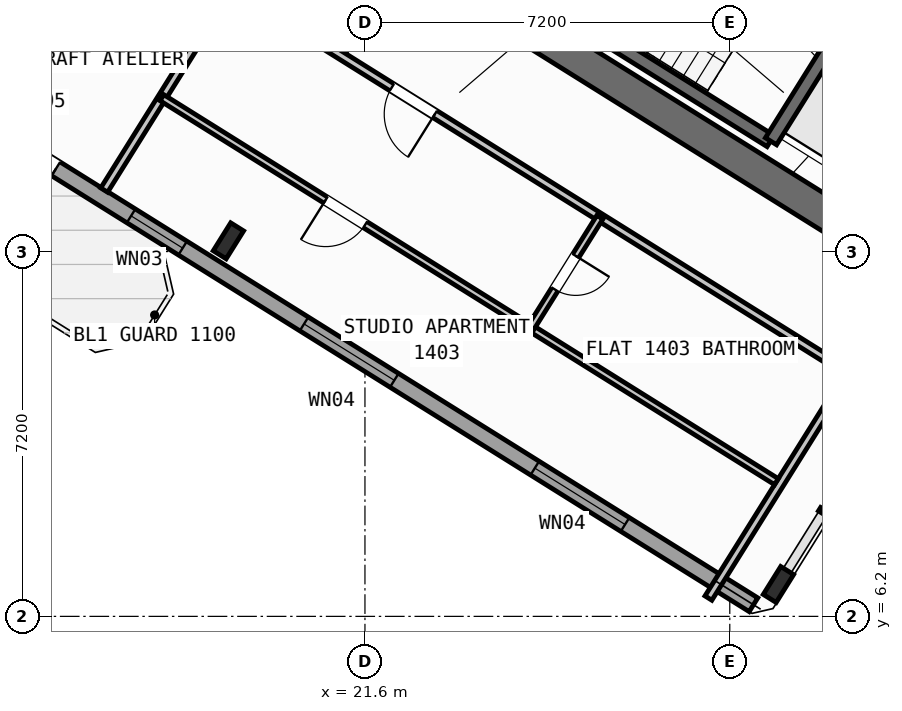
"""IFC4 building model, lengths in metres.
Left out: names, types, materials, properties, quantities, classifications, styles, units other than length and angle.
Written with IfcOpenShell. Run it as: python <this file> out.ifc"""

import sys

from ifc_helpers import new_model, si_unit, direction, frame, frame_2d, origin, origin_2d, place, context, subcontext, project, spatial, rectangle, i_section, extrude, source, transform, mapped, element, fill, save


model = new_model("IFC4")
c1 = context("Model", 3, precision=1e-05, world=origin(), true_north=direction((0.0, 1.0)))
c2 = subcontext(c1, "Body", "Model", "MODEL_VIEW")
j1 = project(units=[si_unit("LENGTHUNIT", "METRE"), si_unit("PLANEANGLEUNIT", "RADIAN")], contexts=[c1])
p1 = place(None, origin())
s1 = spatial("IfcSite", under=j1, at=p1, CompositionType="ELEMENT")
p2 = place(p1, origin())
s2 = spatial("IfcBuilding", under=s1, at=p2, CompositionType="ELEMENT")
p3 = place(p2, frame((0.0, 0.0, 56.4)))
s3 = spatial("IfcBuildingStorey", under=s2, at=p3, CompositionType="ELEMENT", Elevation=56.4)
p4 = place(p3, frame((33.409, 12.45, 0.0), z_axis=(0.0, 0.0, 1.0), x_axis=(-0.848051132073, 0.529914405721, 0.0)))
e1 = element("IfcWall", 1, at=p4, inside=s3, PredefinedType="SHEAR", context=c2, shape_type="SweptSolid", body=[
    extrude(rectangle(XDim=13.24, YDim=0.65, at=frame_2d((6.62, 0.0))), origin(), (0.0, 0.0, 1.0), 3.35),
])
m1 = source(origin(), c2, "Body", "SweptSolid", [
    extrude(i_section(OverallWidth=0.3, OverallDepth=0.65, WebThickness=0.016, FlangeThickness=0.031, at=origin_2d()), origin(), (0.0, 0.0, 1.0), 3.6),
])
for number, where, z_axis, x_axis in (
    (2, (29.761, 6.829, 0.0), (0.0, 0.0, 1.0), (-0.848, 0.53, 0.0)),
    (3, (18.906, 13.612, 0.0), (0.0, 0.0, 1.0), (-0.848, 0.53, 0.0)),
):
    element("IfcColumn", number, at=place(p3, frame(where, z_axis=z_axis, x_axis=x_axis)), inside=s3, PredefinedType="COLUMN", context=c2, shape_type="MappedRepresentation", body=[
        mapped(m1, transform((0.0, 0.0, 0.0), scale=1.0)),
    ])
p5 = place(p3, frame((29.268, 6.429, 0.0), z_axis=(0.0, 0.0, 1.0), x_axis=(-0.848049971435, 0.529916263149, 0.0)))
e4 = element("IfcWall", 4, at=p5, inside=s3, PredefinedType="STANDARD", context=c2, shape_type="SweptSolid", body=[
    extrude(rectangle(XDim=31.588, YDim=0.32, at=frame_2d((15.794, 0.0))), origin(), (0.0, 0.0, 1.0), 3.35),
])
p6 = place(p5, frame((16.235, 0.0, 0.0)))
e5 = element("IfcOpeningElement", 5, at=p6, cuts=e4, PredefinedType="OPENING", context=c2, shape_type="SweptSolid", body=[
    extrude(rectangle(XDim=1.2, YDim=2.15, at=frame_2d((0.6, 1.075))), frame((0.0, 0.17, 0.0), z_axis=(0.0, -1.0, 0.0), x_axis=(1.0, 0.0, 0.0)), (0.0, 0.0, 1.0), 0.34),
])
p7 = place(p5, frame((2.989, 0.0, 0.8)))
e6 = element("IfcOpeningElement", 6, at=p7, cuts=e4, PredefinedType="OPENING", context=c2, shape_type="SweptSolid", body=[
    extrude(rectangle(XDim=2.1, YDim=1.55, at=frame_2d((1.05, 0.775))), frame((0.0, 0.17, 0.0), z_axis=(0.0, -1.0, 0.0), x_axis=(1.0, 0.0, 0.0)), (0.0, 0.0, 1.0), 0.34),
])
p8 = place(p5, frame((8.359, 0.0, 0.8)))
e7 = element("IfcOpeningElement", 7, at=p8, cuts=e4, PredefinedType="OPENING", context=c2, shape_type="SweptSolid", body=[
    extrude(rectangle(XDim=2.1, YDim=1.55, at=frame_2d((1.05, 0.775))), frame((0.0, 0.17, 0.0), z_axis=(0.0, -1.0, 0.0), x_axis=(1.0, 0.0, 0.0)), (0.0, 0.0, 1.0), 0.34),
])
p9 = place(p5, frame((13.284, 0.0, 0.95)))
e8 = element("IfcOpeningElement", 8, at=p9, cuts=e4, PredefinedType="OPENING", context=c2, shape_type="SweptSolid", body=[
    extrude(rectangle(XDim=1.2, YDim=1.4, at=frame_2d((0.6, 0.7))), frame((0.0, 0.17, 0.0), z_axis=(0.0, -1.0, 0.0), x_axis=(1.0, 0.0, 0.0)), (0.0, 0.0, 1.0), 0.34),
])
p10 = place(p5, frame((22.374, 0.0, 0.95)))
e9 = element("IfcOpeningElement", 9, at=p10, cuts=e4, PredefinedType="OPENING", context=c2, shape_type="SweptSolid", body=[
    extrude(rectangle(XDim=1.2, YDim=1.4, at=frame_2d((0.6, 0.7))), frame((0.0, 0.17, 0.0), z_axis=(0.0, -1.0, 0.0), x_axis=(1.0, 0.0, 0.0)), (0.0, 0.0, 1.0), 0.34),
])
p11 = place(p5, frame((26.351, 0.0, 1.0)))
e10 = element("IfcOpeningElement", 10, at=p11, cuts=e4, PredefinedType="OPENING", context=c2, shape_type="SweptSolid", body=[
    extrude(rectangle(XDim=0.9, YDim=1.25, at=frame_2d((0.45, 0.625))), frame((0.0, 0.17, 0.0), z_axis=(0.0, -1.0, 0.0), x_axis=(1.0, 0.0, 0.0)), (0.0, 0.0, 1.0), 0.34),
])
p12 = place(p5, frame((29.052, 0.0, 0.85)))
e11 = element("IfcOpeningElement", 11, at=p12, cuts=e4, PredefinedType="OPENING", context=c2, shape_type="SweptSolid", body=[
    extrude(rectangle(XDim=1.8, YDim=1.5, at=frame_2d((0.9, 0.75))), frame((0.0, 0.17, 0.0), z_axis=(0.0, -1.0, 0.0), x_axis=(1.0, 0.0, 0.0)), (0.0, 0.0, 1.0), 0.34),
])
p13 = place(p3, frame((29.605, 15.581, 0.0), z_axis=(0.0, 0.0, 1.0), x_axis=(-0.848036911448, 0.529937163087, 0.0)))
e12 = element("IfcWall", 12, at=p13, inside=s3, PredefinedType="SHEAR", context=c2, shape_type="SweptSolid", body=[
    extrude(rectangle(XDim=7.46, YDim=0.26, at=frame_2d((3.73, 0.0))), origin(), (0.0, 0.0, 1.0), 3.35),
])
p14 = place(p3, frame((31.288, 18.256, 0.0), z_axis=(0.0, 0.0, 1.0), x_axis=(-0.529943379326, -0.848033026897, 0.0)))
e13 = element("IfcWall", 13, at=p14, inside=s3, PredefinedType="SHEAR", context=c2, shape_type="SweptSolid", body=[
    extrude(rectangle(XDim=3.16, YDim=0.26, at=frame_2d((1.58, 0.0))), origin(), (0.0, 0.0, 1.0), 3.35),
])
p15 = place(p3, frame((21.206, 17.292, 0.0), z_axis=(0.0, 0.0, 1.0), x_axis=(-0.848050851465, 0.529914854792, 0.0)))
e14 = element("IfcWall", 14, at=p15, inside=s3, PredefinedType="PARTITIONING", context=c2, shape_type="SweptSolid", body=[
    extrude(rectangle(XDim=2.61, YDim=0.16, at=frame_2d((1.305, 0.0))), origin(), (0.0, 0.0, 1.0), 3.34),
])
p16 = place(p3, frame((20.719, 21.44, 0.0), z_axis=(0.0, 0.0, 1.0), x_axis=(-0.529906246318, -0.848056230514, 0.0)))
e15 = element("IfcWall", 15, at=p16, inside=s3, PredefinedType="PARTITIONING", context=c2, shape_type="SweptSolid", body=[
    extrude(rectangle(XDim=8.05, YDim=0.16, at=frame_2d((4.025, 0.0))), origin(), (0.0, 0.0, 1.0), 3.34),
])
p17 = place(p3, frame((18.31, 22.946, 0.0), z_axis=(0.0, 0.0, 1.0), x_axis=(-0.529914428959, -0.848051117552, 0.0)))
e16 = element("IfcWall", 16, at=p17, inside=s3, PredefinedType="PARTITIONING", context=c2, shape_type="SweptSolid", body=[
    extrude(rectangle(XDim=8.05, YDim=0.16, at=frame_2d((4.025, 0.0))), origin(), (0.0, 0.0, 1.0), 3.34),
])
p18 = place(p3, frame((32.164, 10.374, 0.0), z_axis=(0.0, 0.0, 1.0), x_axis=(-0.848044107957, 0.529925646633, 0.0)))
e17 = element("IfcWall", 17, at=p18, inside=s3, PredefinedType="PARTITIONING", context=c2, shape_type="SweptSolid", body=[
    extrude(rectangle(XDim=15.57, YDim=0.16, at=frame_2d((7.785, 0.0))), origin(), (0.0, 0.0, 1.0), 3.34),
])
p19 = place(p18, frame((10.83, 0.0, 0.0)))
e18 = element("IfcOpeningElement", 18, at=p19, cuts=e17, PredefinedType="OPENING", context=c2, shape_type="SweptSolid", body=[
    extrude(rectangle(XDim=1.0, YDim=2.1, at=frame_2d((0.5, 1.05))), frame((0.0, 0.09, 0.0), z_axis=(0.0, -1.0, 0.0), x_axis=(1.0, 0.0, 0.0)), (0.0, 0.0, 1.0), 0.18),
])
p20 = place(p3, frame((31.282, 11.208, 0.0), z_axis=(0.0, 0.0, 1.0), x_axis=(-0.529938869374, -0.84803584519, 0.0)))
e19 = element("IfcWall", 19, at=p20, inside=s3, PredefinedType="PARTITIONING", context=c2, shape_type="SweptSolid", body=[
    extrude(rectangle(XDim=5.48, YDim=0.16, at=frame_2d((2.74, 0.0))), origin(), (0.0, 0.0, 1.0), 3.34),
])
p21 = place(p3, frame((29.72, 8.859, 0.0), z_axis=(0.0, 0.0, 1.0), x_axis=(-0.848049134363, 0.529917602752, 0.0)))
e20 = element("IfcWall", 20, at=p21, inside=s3, PredefinedType="PLUMBINGWALL", context=c2, shape_type="SweptSolid", body=[
    extrude(rectangle(XDim=14.3, YDim=0.14, at=frame_2d((7.15, 0.0))), origin(), (0.0, 0.0, 1.0), 3.34),
])
p22 = place(p21, frame((9.57, 0.0, 0.0)))
e21 = element("IfcOpeningElement", 21, at=p22, cuts=e20, PredefinedType="OPENING", context=c2, shape_type="SweptSolid", body=[
    extrude(rectangle(XDim=0.92, YDim=2.08, at=frame_2d((0.46, 1.04))), frame((0.0, 0.08, 0.0), z_axis=(0.0, -1.0, 0.0), x_axis=(1.0, 0.0, 0.0)), (0.0, 0.0, 1.0), 0.16),
])
p23 = place(p3, frame((26.237, 14.078, 0.0), z_axis=(0.0, 0.0, 1.0), x_axis=(-0.52995640672, -0.848024885824, 0.0)))
e22 = element("IfcWall", 22, at=p23, inside=s3, PredefinedType="PLUMBINGWALL", context=c2, shape_type="SweptSolid", body=[
    extrude(rectangle(XDim=2.58, YDim=0.14, at=frame_2d((1.29, 0.0))), origin(), (0.0, 0.0, 1.0), 3.34),
])
p24 = place(p23, frame((0.9, 0.0, 0.0)))
e23 = element("IfcOpeningElement", 23, at=p24, cuts=e22, PredefinedType="OPENING", context=c2, shape_type="SweptSolid", body=[
    extrude(rectangle(XDim=0.78, YDim=2.05, at=frame_2d((0.39, 1.025))), frame((0.0, 0.08, 0.0), z_axis=(0.0, -1.0, 0.0), x_axis=(1.0, 0.0, 0.0)), (0.0, 0.0, 1.0), 0.16),
])
m2 = source(origin(), c2, "Body", "SweptSolid", [
    extrude(rectangle(XDim=1.2, YDim=2.15, at=frame_2d((0.6, 1.075))), frame((0.0, 0.025, 0.0), z_axis=(0.0, -1.0, 0.0), x_axis=(1.0, 0.0, 0.0)), (0.0, 0.0, 1.0), 0.05),
])
p25 = place(p6, origin())
e24 = element("IfcDoor", 24, at=p25, inside=s3, OperationType="SINGLE_SWING_LEFT", PredefinedType="DOOR", context=c2, shape_type="MappedRepresentation", body=[
    mapped(m2, transform((0.0, 0.0, 0.0), scale=1.0)),
])
fill(e5, e24)
m3 = source(origin(), c2, "Body", "SweptSolid", [
    extrude(rectangle(XDim=2.1, YDim=1.55, at=frame_2d((1.05, 0.775))), frame((0.0, 0.03, 0.0), z_axis=(0.0, -1.0, 0.0), x_axis=(1.0, 0.0, 0.0)), (0.0, 0.0, 1.0), 0.06),
])
p26 = place(p7, origin())
e25 = element("IfcWindow", 25, at=p26, inside=s3, PartitioningType="SINGLE_PANEL", PredefinedType="WINDOW", context=c2, shape_type="MappedRepresentation", body=[
    mapped(m3, transform((0.0, 0.0, 0.0), scale=1.0)),
])
fill(e6, e25)
p27 = place(p8, origin())
e26 = element("IfcWindow", 26, at=p27, inside=s3, PartitioningType="SINGLE_PANEL", PredefinedType="WINDOW", context=c2, shape_type="MappedRepresentation", body=[
    mapped(m3, transform((0.0, 0.0, 0.0), scale=1.0)),
])
fill(e7, e26)
m4 = source(origin(), c2, "Body", "SweptSolid", [
    extrude(rectangle(XDim=1.2, YDim=1.4, at=frame_2d((0.6, 0.7))), frame((0.0, 0.03, 0.0), z_axis=(0.0, -1.0, 0.0), x_axis=(1.0, 0.0, 0.0)), (0.0, 0.0, 1.0), 0.06),
])
p28 = place(p9, origin())
e27 = element("IfcWindow", 27, at=p28, inside=s3, PartitioningType="SINGLE_PANEL", PredefinedType="WINDOW", context=c2, shape_type="MappedRepresentation", body=[
    mapped(m4, transform((0.0, 0.0, 0.0), scale=1.0)),
])
fill(e8, e27)
m5 = source(origin(), c2, "Body", "SweptSolid", [
    extrude(rectangle(XDim=1.0, YDim=2.1, at=frame_2d((0.5, 1.05))), frame((0.0, 0.025, 0.0), z_axis=(0.0, -1.0, 0.0), x_axis=(1.0, 0.0, 0.0)), (0.0, 0.0, 1.0), 0.05),
])
p29 = place(p19, origin())
e28 = element("IfcDoor", 28, at=p29, inside=s3, OperationType="SINGLE_SWING_LEFT", PredefinedType="DOOR", context=c2, shape_type="MappedRepresentation", body=[
    mapped(m5, transform((0.0, 0.0, 0.0), scale=1.0)),
])
fill(e18, e28)
m6 = source(origin(), c2, "Body", "SweptSolid", [
    extrude(rectangle(XDim=0.92, YDim=2.08, at=frame_2d((0.46, 1.04))), frame((0.0, 0.025, 0.0), z_axis=(0.0, -1.0, 0.0), x_axis=(1.0, 0.0, 0.0)), (0.0, 0.0, 1.0), 0.05),
])
p30 = place(p22, origin())
e29 = element("IfcDoor", 29, at=p30, inside=s3, OperationType="SINGLE_SWING_RIGHT", PredefinedType="DOOR", context=c2, shape_type="MappedRepresentation", body=[
    mapped(m6, transform((0.0, 0.0, 0.0), scale=1.0)),
])
fill(e21, e29)
m7 = source(origin(), c2, "Body", "SweptSolid", [
    extrude(rectangle(XDim=0.78, YDim=2.05, at=frame_2d((0.39, 1.025))), frame((0.0, 0.025, 0.0), z_axis=(0.0, -1.0, 0.0), x_axis=(1.0, 0.0, 0.0)), (0.0, 0.0, 1.0), 0.05),
])
p31 = place(p24, origin())
e30 = element("IfcDoor", 30, at=p31, inside=s3, OperationType="SINGLE_SWING_LEFT", PredefinedType="DOOR", context=c2, shape_type="MappedRepresentation", body=[
    mapped(m7, transform((0.0, 0.0, 0.0), scale=1.0)),
])
fill(e23, e30)
save(model, sys.argv[1])
